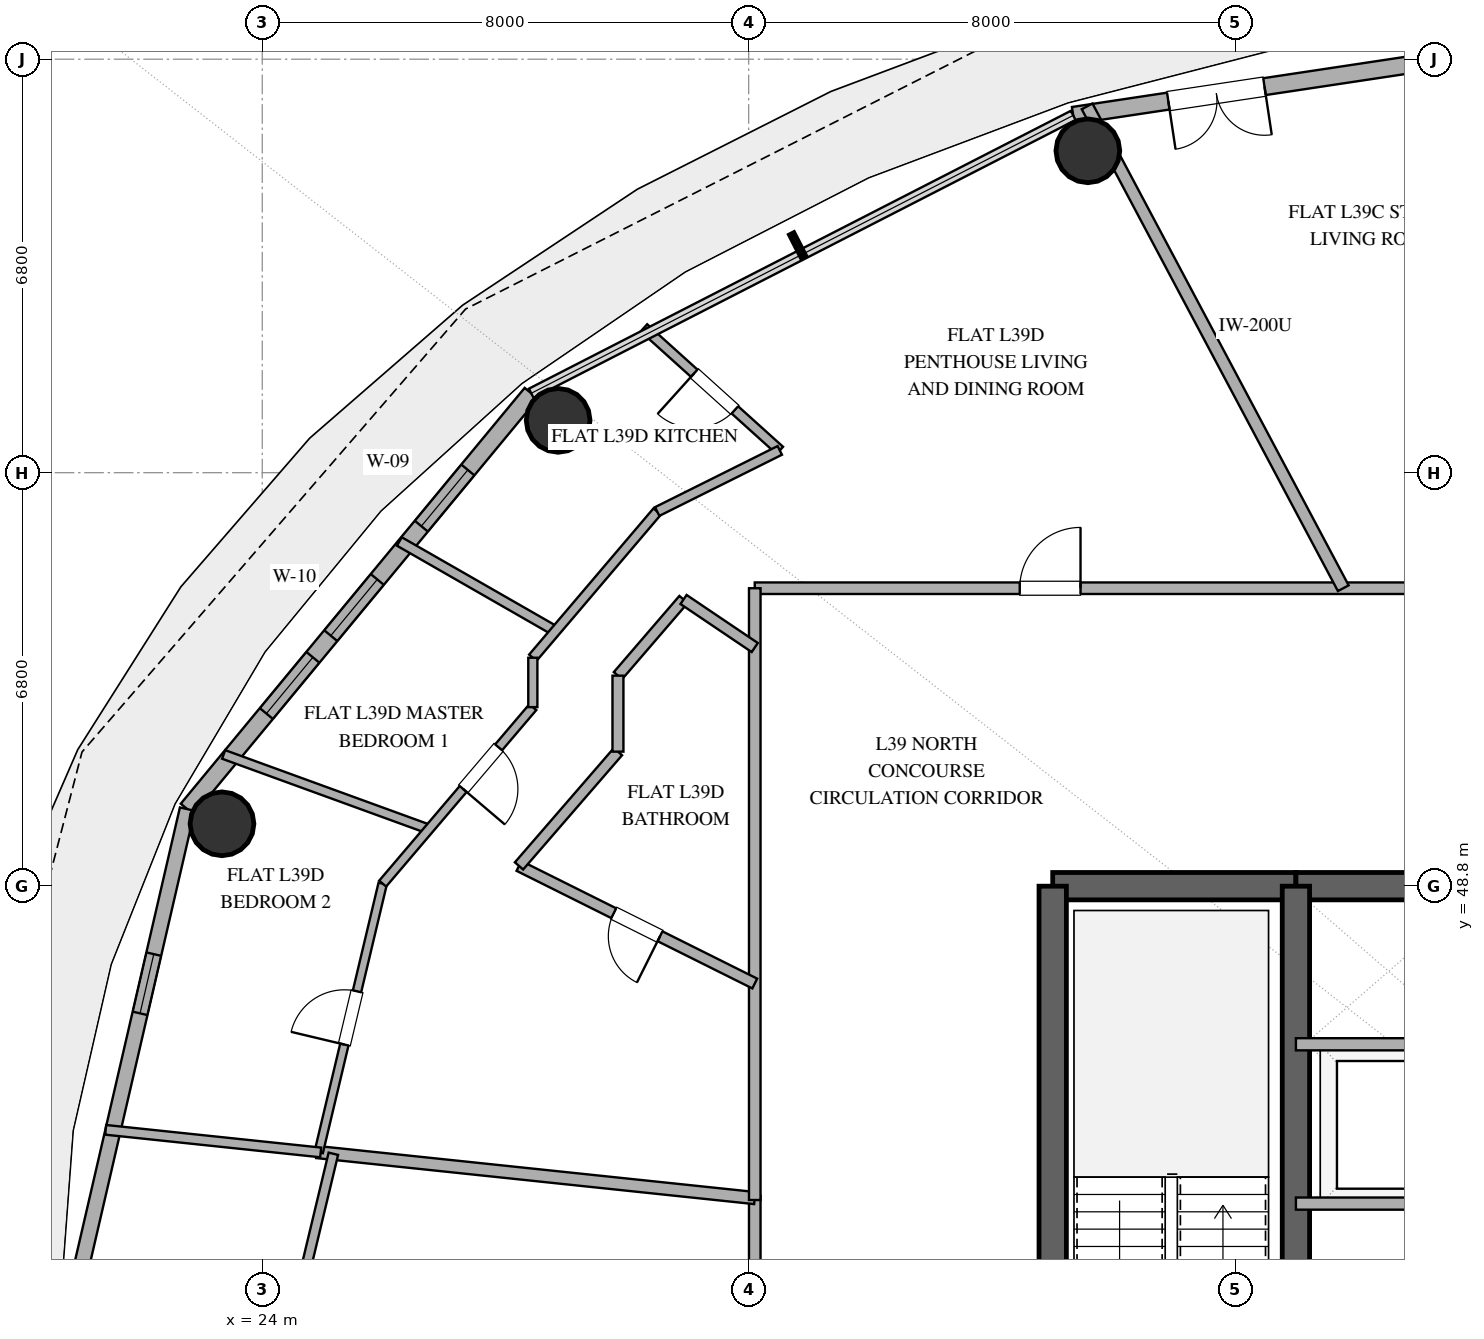
"""IFC4 building model, lengths in metres.
Left out: names, types, materials, properties, quantities, classifications, styles, units other than length and angle.
Written with IfcOpenShell. Run it as: python <this file> out.ifc"""

import sys

from ifc_helpers import new_model, si_unit, direction, frame, frame_2d, origin, origin_2d, place, context, subcontext, project, spatial, rectangle, hollow_circle, extrude, element, fill, save


model = new_model("IFC4")
c1 = context("Model", 3, precision=1e-05, world=origin(), true_north=direction((0.0, 1.0)))
c2 = subcontext(c1, "Body", "Model", "MODEL_VIEW")
j1 = project(units=[si_unit("LENGTHUNIT", "METRE"), si_unit("PLANEANGLEUNIT", "RADIAN")], contexts=[c1])
p1 = place(None, origin())
s1 = spatial("IfcSite", under=j1, at=p1, CompositionType="ELEMENT")
p2 = place(p1, origin())
s2 = spatial("IfcBuilding", under=s1, at=p2, CompositionType="ELEMENT")
p3 = place(p2, frame((0.0, 0.0, 157.8)))
s3 = spatial("IfcBuildingStorey", under=s2, at=p3, CompositionType="ELEMENT", Elevation=157.8)
p4 = place(p3, frame((37.0, 48.8, 0.0), z_axis=(0.0, 0.0, 1.0), x_axis=(1.0, 0.0, 0.0)))
e1 = element("IfcWall", 1, at=p4, inside=s3, PredefinedType="SHEAR", context=c2, shape_type="SweptSolid", body=[
    extrude(rectangle(XDim=4.0, YDim=0.45, at=frame_2d((2.0, 0.0))), origin(), (0.0, 0.0, 1.0), 3.38),
])
p5 = place(p3, frame((41.0, 48.8, 0.0), z_axis=(0.0, 0.0, 1.0), x_axis=(1.0, 0.0, 0.0)))
e2 = element("IfcWall", 2, at=p5, inside=s3, PredefinedType="SHEAR", context=c2, shape_type="SweptSolid", body=[
    extrude(rectangle(XDim=14.0, YDim=0.45, at=frame_2d((7.0, 0.0))), origin(), (0.0, 0.0, 1.0), 3.38),
])
p6 = place(p5, frame((6.1, 0.0, 0.0)))
e3 = element("IfcOpeningElement", 3, at=p6, cuts=e2, PredefinedType="OPENING", context=c2, shape_type="SweptSolid", body=[
    extrude(rectangle(XDim=1.8, YDim=2.25, at=frame_2d((0.9, 1.125))), frame((0.0, 0.235, 0.0), z_axis=(0.0, -1.0, 0.0), x_axis=(1.0, 0.0, 0.0)), (0.0, 0.0, 1.0), 0.47),
])
p7 = place(p3, frame((37.0, 35.2, 0.0), z_axis=(0.0, 0.0, 1.0), x_axis=(0.0, 1.0, 0.0)))
e4 = element("IfcWall", 4, at=p7, inside=s3, PredefinedType="SHEAR", context=c2, shape_type="SweptSolid", body=[
    extrude(rectangle(XDim=13.6, YDim=0.45, at=frame_2d((6.8, 0.0))), origin(), (0.0, 0.0, 1.0), 3.38),
])
p8 = place(p3, frame((41.0, 35.2, 0.0), z_axis=(0.0, 0.0, 1.0), x_axis=(0.0, 1.0, 0.0)))
e5 = element("IfcWall", 5, at=p8, inside=s3, PredefinedType="SHEAR", context=c2, shape_type="SweptSolid", body=[
    extrude(rectangle(XDim=13.6, YDim=0.45, at=frame_2d((6.8, 0.0))), origin(), (0.0, 0.0, 1.0), 3.38),
])
p9 = place(p8, frame((1.15, 0.0, 0.0)))
e6 = element("IfcOpeningElement", 6, at=p9, cuts=e5, PredefinedType="OPENING", context=c2, shape_type="SweptSolid", body=[
    extrude(rectangle(XDim=1.1, YDim=2.2, at=frame_2d((0.55, 1.1))), frame((0.0, 0.235, 0.0), z_axis=(0.0, -1.0, 0.0), x_axis=(1.0, 0.0, 0.0)), (0.0, 0.0, 1.0), 0.47),
])
for number, where, z_axis, x_axis in (
    (7, (37.578, 60.893, 0.0), (0.0, 0.0, 1.0), (1.0, 0.0, 0.0)),
    (8, (28.866, 56.46, 0.0), (0.0, 0.0, 1.0), (1.0, 0.0, 0.0)),
    (9, (23.338, 49.826, 0.0), (0.0, 0.0, 1.0), (1.0, 0.0, 0.0)),
):
    element("IfcColumn", number, at=place(p3, frame(where, z_axis=z_axis, x_axis=x_axis)), inside=s3, PredefinedType="COLUMN", context=c2, shape_type="SweptSolid", body=[
        extrude(hollow_circle(Radius=0.525, WallThickness=0.028, at=origin_2d()), origin(), (0.0, 0.0, 1.0), 3.38),
    ])
p10 = place(p3, frame((48.0, 63.08, 0.0), z_axis=(0.0, 0.0, 1.0), x_axis=(-0.988863993413, -0.148822049884, 0.0)))
e10 = element("IfcWall", 10, at=p10, inside=s3, PredefinedType="SOLIDWALL", context=c2, shape_type="SweptSolid", body=[
    extrude(rectangle(XDim=10.783, YDim=0.28, at=frame_2d((5.392, 0.0))), origin(), (0.0, 0.0, 1.0), 3.38),
])
p11 = place(p10, frame((7.601, 0.0, 0.0)))
e11 = element("IfcOpeningElement", 11, at=p11, cuts=e10, PredefinedType="OPENING", context=c2, shape_type="SweptSolid", body=[
    extrude(rectangle(XDim=1.6, YDim=2.25, at=frame_2d((0.8, 1.125))), frame((0.0, 0.15, 0.0), z_axis=(0.0, -1.0, 0.0), x_axis=(1.0, 0.0, 0.0)), (0.0, 0.0, 1.0), 0.3),
])
p12 = place(p3, frame((28.424, 56.906, 0.0), z_axis=(0.0, 0.0, 1.0), x_axis=(-0.637333477683, -0.770588111915, 0.0)))
e12 = element("IfcWall", 12, at=p12, inside=s3, PredefinedType="SOLIDWALL", context=c2, shape_type="SweptSolid", body=[
    extrude(rectangle(XDim=8.875, YDim=0.28, at=frame_2d((4.438, 0.0))), origin(), (0.0, 0.0, 1.0), 3.38),
])
p13 = place(p12, frame((1.636, 0.0, 0.85)))
e13 = element("IfcOpeningElement", 13, at=p13, cuts=e12, PredefinedType="OPENING", context=c2, shape_type="SweptSolid", body=[
    extrude(rectangle(XDim=1.2, YDim=1.8, at=frame_2d((0.6, 0.9))), frame((0.0, 0.15, 0.0), z_axis=(0.0, -1.0, 0.0), x_axis=(1.0, 0.0, 0.0)), (0.0, 0.0, 1.0), 0.3),
])
p14 = place(p12, frame((3.973, 0.0, 0.85)))
e14 = element("IfcOpeningElement", 14, at=p14, cuts=e12, PredefinedType="OPENING", context=c2, shape_type="SweptSolid", body=[
    extrude(rectangle(XDim=1.2, YDim=1.6, at=frame_2d((0.6, 0.8))), frame((0.0, 0.15, 0.0), z_axis=(0.0, -1.0, 0.0), x_axis=(1.0, 0.0, 0.0)), (0.0, 0.0, 1.0), 0.3),
])
p15 = place(p12, frame((5.635, 0.0, 0.85)))
e15 = element("IfcOpeningElement", 15, at=p15, cuts=e12, PredefinedType="OPENING", context=c2, shape_type="SweptSolid", body=[
    extrude(rectangle(XDim=1.2, YDim=1.6, at=frame_2d((0.6, 0.8))), frame((0.0, 0.15, 0.0), z_axis=(0.0, -1.0, 0.0), x_axis=(1.0, 0.0, 0.0)), (0.0, 0.0, 1.0), 0.3),
])
p16 = place(p3, frame((22.768, 50.067, 0.0), z_axis=(0.0, 0.0, 1.0), x_axis=(-0.225473184558, -0.974249374157, 0.0)))
e16 = element("IfcWall", 16, at=p16, inside=s3, PredefinedType="SOLIDWALL", context=c2, shape_type="SweptSolid", body=[
    extrude(rectangle(XDim=8.28, YDim=0.25, at=frame_2d((4.14, 0.0))), origin(), (0.0, 0.0, 1.0), 3.38),
])
p17 = place(p16, frame((2.447, 0.0, 0.35)))
e17 = element("IfcOpeningElement", 17, at=p17, cuts=e16, PredefinedType="OPENING", context=c2, shape_type="SweptSolid", body=[
    extrude(rectangle(XDim=1.0, YDim=1.05, at=frame_2d((0.5, 0.525))), frame((0.0, 0.135, 0.0), z_axis=(0.0, -1.0, 0.0), x_axis=(1.0, 0.0, 0.0)), (0.0, 0.0, 1.0), 0.27),
])
for number, where, z_axis, x_axis in (
    (18, (41.0, 46.2, 0.0), (0.0, 0.0, 1.0), (1.0, 0.0, 0.0)),
    (19, (41.0, 43.58, 0.0), (0.0, 0.0, 1.0), (1.0, 0.0, 0.0)),
):
    element("IfcWall", number, at=place(p3, frame(where, z_axis=z_axis, x_axis=x_axis)), inside=s3, PredefinedType="SOLIDWALL", context=c2, shape_type="SweptSolid", body=[
        extrude(rectangle(XDim=2.95, YDim=0.2, at=frame_2d((1.475, 0.0))), origin(), (0.0, 0.0, 1.0), 2.74),
    ])
p18 = place(p3, frame((32.1, 53.7, 0.0), z_axis=(0.0, 0.0, 1.0), x_axis=(1.0, 0.0, 0.0)))
e20 = element("IfcWall", 20, at=p18, inside=s3, PredefinedType="PARTITIONING", context=c2, shape_type="SweptSolid", body=[
    extrude(rectangle(XDim=17.576, YDim=0.19, at=frame_2d((8.788, 0.0))), origin(), (0.0, 0.0, 1.0), 2.74),
])
p19 = place(p18, frame((4.358, 0.0, 0.0)))
e21 = element("IfcOpeningElement", 21, at=p19, cuts=e20, PredefinedType="OPENING", context=c2, shape_type="SweptSolid", body=[
    extrude(rectangle(XDim=1.0, YDim=2.2, at=frame_2d((0.5, 1.1))), frame((0.0, 0.105, 0.0), z_axis=(0.0, -1.0, 0.0), x_axis=(1.0, 0.0, 0.0)), (0.0, 0.0, 1.0), 0.21),
])
p20 = place(p18, frame((11.706, 0.0, 0.0)))
e22 = element("IfcOpeningElement", 22, at=p20, cuts=e20, PredefinedType="OPENING", context=c2, shape_type="SweptSolid", body=[
    extrude(rectangle(XDim=1.0, YDim=2.2, at=frame_2d((0.5, 1.1))), frame((0.0, 0.105, 0.0), z_axis=(0.0, -1.0, 0.0), x_axis=(1.0, 0.0, 0.0)), (0.0, 0.0, 1.0), 0.21),
])
p21 = place(p3, frame((37.566, 61.624, 0.0), z_axis=(0.0, 0.0, 1.0), x_axis=(0.469466796814, -0.882950126955, 0.0)))
e23 = element("IfcWall", 23, at=p21, inside=s3, PredefinedType="PARTITIONING", context=c2, shape_type="SweptSolid", body=[
    extrude(rectangle(XDim=8.975, YDim=0.2, at=frame_2d((4.487, 0.0))), origin(), (0.0, 0.0, 1.0), 2.74),
])
p22 = place(p3, frame((32.1, 30.3, 0.0), z_axis=(0.0, 0.0, 1.0), x_axis=(0.0, 1.0, 0.0)))
e24 = element("IfcWall", 24, at=p22, inside=s3, PredefinedType="PARTITIONING", context=c2, shape_type="SweptSolid", body=[
    extrude(rectangle(XDim=13.403, YDim=0.19, at=frame_2d((6.702, 0.0))), origin(), (0.0, 0.0, 1.0), 2.74),
])
p23 = place(p22, frame((3.531, 0.0, 0.0)))
e25 = element("IfcOpeningElement", 25, at=p23, cuts=e24, PredefinedType="OPENING", context=c2, shape_type="SweptSolid", body=[
    extrude(rectangle(XDim=1.0, YDim=2.2, at=frame_2d((0.5, 1.1))), frame((0.0, 0.105, 0.0), z_axis=(0.0, -1.0, 0.0), x_axis=(1.0, 0.0, 0.0)), (0.0, 0.0, 1.0), 0.21),
])
p24 = place(p3, frame((32.1, 43.671, 0.0), z_axis=(0.0, 0.0, 1.0), x_axis=(-0.994522615629, 0.104521610217, 0.0)))
e26 = element("IfcWall", 26, at=p24, inside=s3, PredefinedType="PARTITIONING", context=c2, shape_type="SweptSolid", body=[
    extrude(rectangle(XDim=7.243, YDim=0.2, at=frame_2d((3.622, 0.0))), origin(), (0.0, 0.0, 1.0), 2.74),
])
p25 = place(p3, frame((32.1, 43.639, 0.0), z_axis=(0.0, 0.0, 1.0), x_axis=(0.0, 1.0, 0.0)))
e27 = element("IfcWall", 27, at=p25, inside=s3, PredefinedType="PARTITIONING", context=c2, shape_type="SweptSolid", body=[
    extrude(rectangle(XDim=10.061, YDim=0.19, at=frame_2d((5.031, 0.0))), origin(), (0.0, 0.0, 1.0), 2.74),
])
p26 = place(p3, frame((24.929, 44.425, 0.0), z_axis=(0.0, 0.0, 1.0), x_axis=(0.23166656053, 0.972795253243, 0.0)))
e28 = element("IfcWall", 28, at=p26, inside=s3, PredefinedType="PARTITIONING", context=c2, shape_type="SweptSolid", body=[
    extrude(rectangle(XDim=4.541, YDim=0.14, at=frame_2d((2.271, 0.0))), origin(), (0.0, 0.0, 1.0), 2.74),
])
p27 = place(p26, frame((1.821, 0.0, 0.0)))
e29 = element("IfcOpeningElement", 29, at=p27, cuts=e28, PredefinedType="OPENING", context=c2, shape_type="SweptSolid", body=[
    extrude(rectangle(XDim=0.9, YDim=2.1, at=frame_2d((0.45, 1.05))), frame((0.0, 0.08, 0.0), z_axis=(0.0, -1.0, 0.0), x_axis=(1.0, 0.0, 0.0)), (0.0, 0.0, 1.0), 0.16),
])
p28 = place(p3, frame((32.1, 47.199, 0.0), z_axis=(0.0, 0.0, 1.0), x_axis=(-0.89485499518, 0.446356962084, 0.0)))
e30 = element("IfcWall", 30, at=p28, inside=s3, PredefinedType="PLUMBINGWALL", context=c2, shape_type="SweptSolid", body=[
    extrude(rectangle(XDim=4.333, YDim=0.18, at=frame_2d((2.167, 0.0))), origin(), (0.0, 0.0, 1.0), 2.74),
])
p29 = place(p28, frame((1.741, 0.0, 0.0)))
e31 = element("IfcOpeningElement", 31, at=p29, cuts=e30, PredefinedType="OPENING", context=c2, shape_type="SweptSolid", body=[
    extrude(rectangle(XDim=0.85, YDim=2.1, at=frame_2d((0.425, 1.05))), frame((0.0, 0.1, 0.0), z_axis=(0.0, -1.0, 0.0), x_axis=(1.0, 0.0, 0.0)), (0.0, 0.0, 1.0), 0.2),
])
p30 = place(p3, frame((26.742, 49.737, 0.0), z_axis=(0.0, 0.0, 1.0), x_axis=(-0.939702146374, 0.341993970854, 0.0)))
e32 = element("IfcWall", 32, at=p30, inside=s3, PredefinedType="PARTITIONING", context=c2, shape_type="SweptSolid", body=[
    extrude(rectangle(XDim=3.594, YDim=0.15, at=frame_2d((1.797, 0.0))), origin(), (0.0, 0.0, 1.0), 2.74),
])
p31 = place(p3, frame((21.425, 44.793, 0.0), z_axis=(0.0, 0.0, 1.0), x_axis=(0.994516359121, -0.104581123727, 0.0)))
e33 = element("IfcWall", 33, at=p31, inside=s3, PredefinedType="PLUMBINGWALL", context=c2, shape_type="SweptSolid", body=[
    extrude(rectangle(XDim=3.555, YDim=0.16, at=frame_2d((1.778, 0.0))), origin(), (0.0, 0.0, 1.0), 2.74),
])
p32 = place(p3, frame((32.512, 55.967, 0.0), z_axis=(0.0, 0.0, 1.0), x_axis=(-0.74263222061, 0.669699473579, 0.0)))
e34 = element("IfcWall", 34, at=p32, inside=s3, PredefinedType="PLUMBINGWALL", context=c2, shape_type="SweptSolid", body=[
    extrude(rectangle(XDim=3.009, YDim=0.16, at=frame_2d((1.505, 0.0))), origin(), (0.0, 0.0, 1.0), 2.74),
])
p33 = place(p32, frame((0.995, 0.0, 0.0)))
e35 = element("IfcOpeningElement", 35, at=p33, cuts=e34, PredefinedType="OPENING", context=c2, shape_type="SweptSolid", body=[
    extrude(rectangle(XDim=0.9, YDim=2.1, at=frame_2d((0.45, 1.05))), frame((0.0, 0.09, 0.0), z_axis=(0.0, -1.0, 0.0), x_axis=(1.0, 0.0, 0.0)), (0.0, 0.0, 1.0), 0.18),
])
p34 = place(p3, frame((26.255, 54.469, 0.0), z_axis=(0.0, 0.0, 1.0), x_axis=(0.867481094493, -0.497470150558, 0.0)))
e36 = element("IfcWall", 36, at=p34, inside=s3, PredefinedType="PLUMBINGWALL", context=c2, shape_type="SweptSolid", body=[
    extrude(rectangle(XDim=2.961, YDim=0.16, at=frame_2d((1.48, 0.0))), origin(), (0.0, 0.0, 1.0), 2.74),
])
p35 = place(p3, frame((28.45, 51.744, 0.0), z_axis=(0.0, 0.0, 1.0), x_axis=(-0.648090958091, -0.761562938988, 0.0)))
e37 = element("IfcWall", 37, at=p35, inside=s3, PredefinedType="PARTITIONING", context=c2, shape_type="SweptSolid", body=[
    extrude(rectangle(XDim=3.81, YDim=0.15, at=frame_2d((1.905, 0.0))), origin(), (0.0, 0.0, 1.0), 2.74),
])
p36 = place(p35, frame((0.868, 0.0, 0.0)))
e38 = element("IfcOpeningElement", 38, at=p36, cuts=e37, PredefinedType="OPENING", context=c2, shape_type="SweptSolid", body=[
    extrude(rectangle(XDim=0.9, YDim=2.1, at=frame_2d((0.45, 1.05))), frame((0.0, 0.085, 0.0), z_axis=(0.0, -1.0, 0.0), x_axis=(1.0, 0.0, 0.0)), (0.0, 0.0, 1.0), 0.17),
])
p37 = place(p3, frame((28.45, 52.557, 0.0), z_axis=(0.0, 0.0, 1.0), x_axis=(0.647888606369, 0.761735094201, 0.0)))
e39 = element("IfcWall", 39, at=p37, inside=s3, PredefinedType="PLUMBINGWALL", context=c2, shape_type="SweptSolid", body=[
    extrude(rectangle(XDim=3.157, YDim=0.16, at=frame_2d((1.578, 0.0))), origin(), (0.0, 0.0, 1.0), 2.74),
])
p38 = place(p3, frame((28.223, 49.133, 0.0), z_axis=(0.0, 0.0, 1.0), x_axis=(0.654567839364, 0.756003269616, 0.0)))
e40 = element("IfcWall", 40, at=p38, inside=s3, PredefinedType="PLUMBINGWALL", context=c2, shape_type="SweptSolid", body=[
    extrude(rectangle(XDim=2.486, YDim=0.18, at=frame_2d((1.243, 0.0))), origin(), (0.0, 0.0, 1.0), 2.74),
])
p39 = place(p3, frame((25.169, 44.4, 0.0), z_axis=(0.0, 0.0, 1.0), x_axis=(-0.233096038601, -0.972453719613, 0.0)))
e41 = element("IfcWall", 41, at=p39, inside=s3, PredefinedType="PLUMBINGWALL", context=c2, shape_type="SweptSolid", body=[
    extrude(rectangle(XDim=2.468, YDim=0.16, at=frame_2d((1.234, 0.0))), origin(), (0.0, 0.0, 1.0), 2.74),
])
p40 = place(p3, frame((30.495, 54.961, 0.0), z_axis=(0.0, 0.0, 1.0), x_axis=(0.894946652065, 0.446173161405, 0.0)))
e42 = element("IfcWall", 42, at=p40, inside=s3, PredefinedType="PLUMBINGWALL", context=c2, shape_type="SweptSolid", body=[
    extrude(rectangle(XDim=2.253, YDim=0.16, at=frame_2d((1.127, 0.0))), origin(), (0.0, 0.0, 1.0), 2.74),
])
p41 = place(p3, frame((29.85, 52.262, 0.0), z_axis=(0.0, 0.0, 1.0), x_axis=(0.652334661778, 0.757931058239, 0.0)))
e43 = element("IfcWall", 43, at=p41, inside=s3, PredefinedType="PLUMBINGWALL", context=c2, shape_type="SweptSolid", body=[
    extrude(rectangle(XDim=1.653, YDim=0.18, at=frame_2d((0.827, 0.0))), origin(), (0.0, 0.0, 1.0), 2.74),
])
p42 = place(p3, frame((30.928, 53.515, 0.0), z_axis=(0.0, 0.0, 1.0), x_axis=(0.829034879431, -0.55919689617, 0.0)))
e44 = element("IfcWall", 44, at=p42, inside=s3, PredefinedType="PLUMBINGWALL", context=c2, shape_type="SweptSolid", body=[
    extrude(rectangle(XDim=1.413, YDim=0.18, at=frame_2d((0.707, 0.0))), origin(), (0.0, 0.0, 1.0), 2.74),
])
p43 = place(p3, frame((29.85, 51.013, 0.0), z_axis=(0.0, 0.0, 1.0), x_axis=(0.0, 1.0, 0.0)))
e45 = element("IfcWall", 45, at=p43, inside=s3, PredefinedType="PLUMBINGWALL", context=c2, shape_type="SweptSolid", body=[
    extrude(rectangle(XDim=1.249, YDim=0.18, at=frame_2d((0.625, 0.0))), origin(), (0.0, 0.0, 1.0), 2.74),
])
p44 = place(p3, frame((28.45, 52.557, 0.0), z_axis=(0.0, 0.0, 1.0), x_axis=(0.0, -1.0, 0.0)))
e46 = element("IfcWall", 46, at=p44, inside=s3, PredefinedType="PARTITIONING", context=c2, shape_type="SweptSolid", body=[
    extrude(rectangle(XDim=0.812, YDim=0.15, at=frame_2d((0.406, 0.0))), origin(), (0.0, 0.0, 1.0), 2.74),
])
p45 = place(p11, origin())
e47 = element("IfcDoor", 47, at=p45, inside=s3, OperationType="DOUBLE_DOOR_SINGLE_SWING", PredefinedType="DOOR", context=c2, shape_type="SweptSolid", body=[
    extrude(rectangle(XDim=1.6, YDim=2.25, at=frame_2d((0.8, 1.125))), frame((0.0, 0.025, 0.0), z_axis=(0.0, -1.0, 0.0), x_axis=(1.0, 0.0, 0.0)), (0.0, 0.0, 1.0), 0.05),
])
fill(e11, e47)
p46 = place(p13, origin())
e48 = element("IfcWindow", 48, at=p46, inside=s3, PartitioningType="SINGLE_PANEL", PredefinedType="WINDOW", context=c2, shape_type="SweptSolid", body=[
    extrude(rectangle(XDim=1.2, YDim=1.8, at=frame_2d((0.6, 0.9))), frame((0.0, 0.03, 0.0), z_axis=(0.0, -1.0, 0.0), x_axis=(1.0, 0.0, 0.0)), (0.0, 0.0, 1.0), 0.06),
])
fill(e13, e48)
p47 = place(p14, origin())
e49 = element("IfcWindow", 49, at=p47, inside=s3, PartitioningType="SINGLE_PANEL", PredefinedType="WINDOW", context=c2, shape_type="SweptSolid", body=[
    extrude(rectangle(XDim=1.2, YDim=1.6, at=frame_2d((0.6, 0.8))), frame((0.0, 0.03, 0.0), z_axis=(0.0, -1.0, 0.0), x_axis=(1.0, 0.0, 0.0)), (0.0, 0.0, 1.0), 0.06),
])
fill(e14, e49)
p48 = place(p15, origin())
e50 = element("IfcWindow", 50, at=p48, inside=s3, PartitioningType="SINGLE_PANEL", PredefinedType="WINDOW", context=c2, shape_type="SweptSolid", body=[
    extrude(rectangle(XDim=1.2, YDim=1.6, at=frame_2d((0.6, 0.8))), frame((0.0, 0.03, 0.0), z_axis=(0.0, -1.0, 0.0), x_axis=(1.0, 0.0, 0.0)), (0.0, 0.0, 1.0), 0.06),
])
fill(e15, e50)
p49 = place(p17, origin())
e51 = element("IfcWindow", 51, at=p49, inside=s3, PartitioningType="SINGLE_PANEL", PredefinedType="WINDOW", context=c2, shape_type="SweptSolid", body=[
    extrude(rectangle(XDim=1.0, YDim=1.05, at=frame_2d((0.5, 0.525))), frame((0.0, 0.03, 0.0), z_axis=(0.0, -1.0, 0.0), x_axis=(1.0, 0.0, 0.0)), (0.0, 0.0, 1.0), 0.06),
])
fill(e17, e51)
p50 = place(p19, origin())
e52 = element("IfcDoor", 52, at=p50, inside=s3, OperationType="SINGLE_SWING_RIGHT", PredefinedType="DOOR", context=c2, shape_type="SweptSolid", body=[
    extrude(rectangle(XDim=1.0, YDim=2.2, at=frame_2d((0.5, 1.1))), frame((0.0, 0.025, 0.0), z_axis=(0.0, -1.0, 0.0), x_axis=(1.0, 0.0, 0.0)), (0.0, 0.0, 1.0), 0.05),
])
fill(e21, e52)
p51 = place(p27, origin())
e53 = element("IfcDoor", 53, at=p51, inside=s3, OperationType="SINGLE_SWING_LEFT", PredefinedType="DOOR", context=c2, shape_type="SweptSolid", body=[
    extrude(rectangle(XDim=0.9, YDim=2.1, at=frame_2d((0.45, 1.05))), frame((0.0, 0.025, 0.0), z_axis=(0.0, -1.0, 0.0), x_axis=(1.0, 0.0, 0.0)), (0.0, 0.0, 1.0), 0.05),
])
fill(e29, e53)
p52 = place(p29, origin())
e54 = element("IfcDoor", 54, at=p52, inside=s3, OperationType="SINGLE_SWING_LEFT", PredefinedType="DOOR", context=c2, shape_type="SweptSolid", body=[
    extrude(rectangle(XDim=0.85, YDim=2.1, at=frame_2d((0.425, 1.05))), frame((0.0, 0.025, 0.0), z_axis=(0.0, -1.0, 0.0), x_axis=(1.0, 0.0, 0.0)), (0.0, 0.0, 1.0), 0.05),
])
fill(e31, e54)
p53 = place(p33, origin())
e55 = element("IfcDoor", 55, at=p53, inside=s3, OperationType="SINGLE_SWING_RIGHT", PredefinedType="DOOR", context=c2, shape_type="SweptSolid", body=[
    extrude(rectangle(XDim=0.9, YDim=2.1, at=frame_2d((0.45, 1.05))), frame((0.0, 0.025, 0.0), z_axis=(0.0, -1.0, 0.0), x_axis=(1.0, 0.0, 0.0)), (0.0, 0.0, 1.0), 0.05),
])
fill(e35, e55)
p54 = place(p36, origin())
e56 = element("IfcDoor", 56, at=p54, inside=s3, OperationType="SINGLE_SWING_RIGHT", PredefinedType="DOOR", context=c2, shape_type="SweptSolid", body=[
    extrude(rectangle(XDim=0.9, YDim=2.1, at=frame_2d((0.45, 1.05))), frame((0.0, 0.025, 0.0), z_axis=(0.0, -1.0, 0.0), x_axis=(1.0, 0.0, 0.0)), (0.0, 0.0, 1.0), 0.05),
])
fill(e38, e56)
save(model, sys.argv[1])
